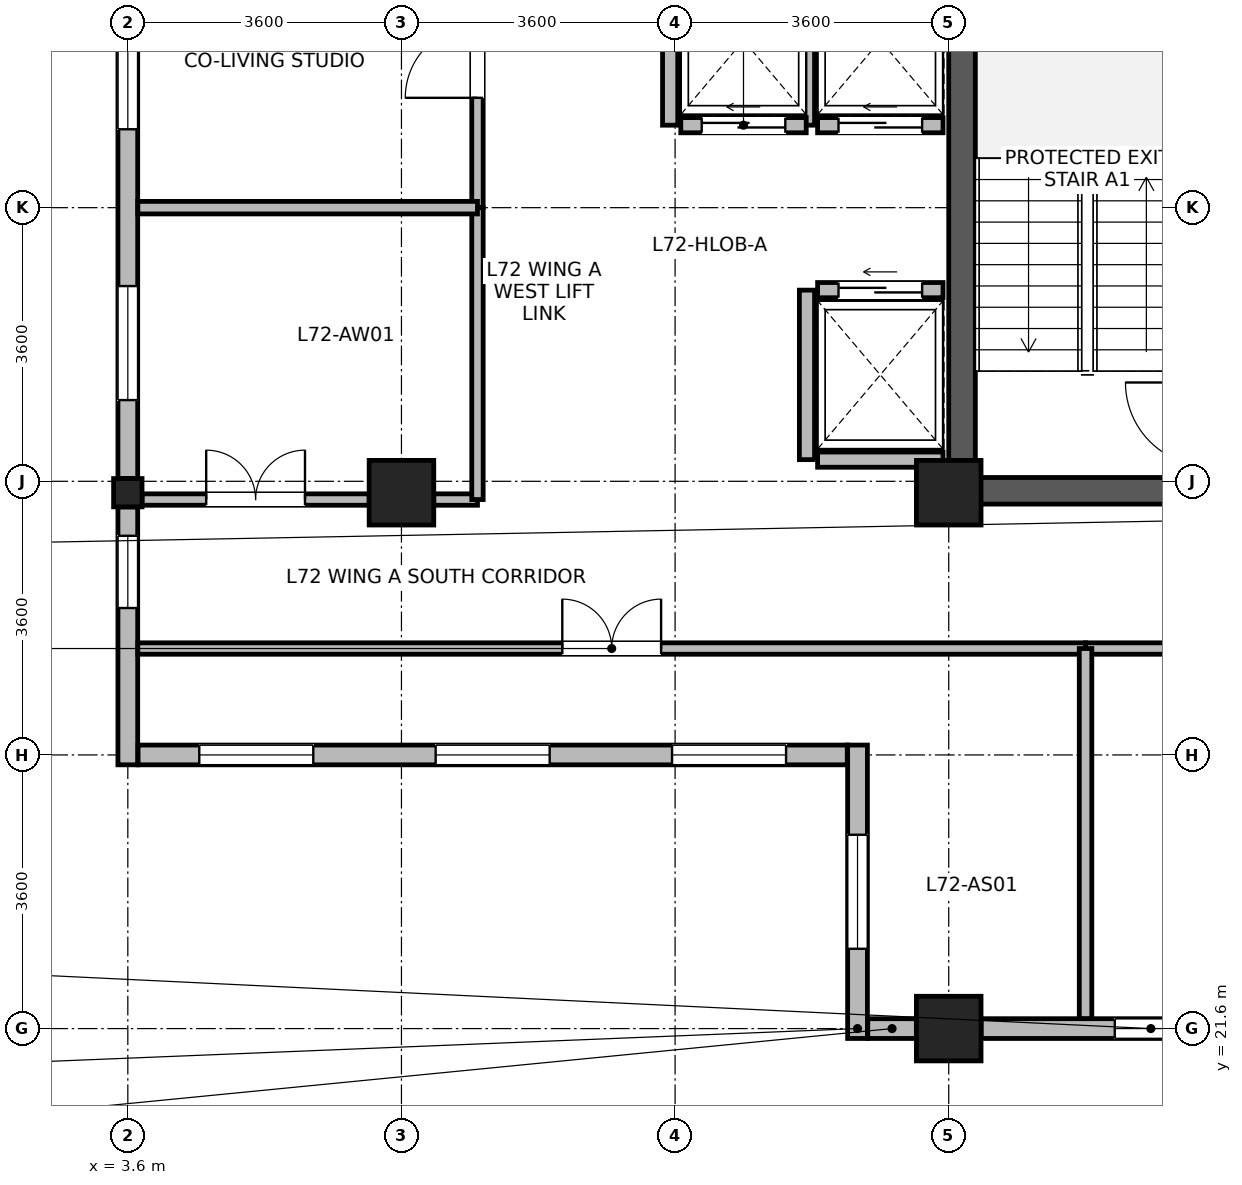
"""IFC4 building model, lengths in metres.
Left out: names, types, materials, properties, quantities, classifications, styles, units other than length and angle.
Written with IfcOpenShell. Run it as: python <this file> out.ifc"""

import sys

from ifc_helpers import new_model, si_unit, direction, frame, frame_2d, origin, origin_2d, place, context, subcontext, project, spatial, rectangle, i_section, extrude, source, transform, mapped, element, fill, save


model = new_model("IFC4")
c1 = context("Model", 3, precision=1e-05, world=origin(), true_north=direction((0.0, 1.0)))
c2 = subcontext(c1, "Body", "Model", "MODEL_VIEW")
j1 = project(units=[si_unit("LENGTHUNIT", "METRE"), si_unit("PLANEANGLEUNIT", "RADIAN")], contexts=[c1])
p1 = place(None, origin())
s1 = spatial("IfcSite", under=j1, at=p1, CompositionType="ELEMENT")
p2 = place(p1, origin())
s2 = spatial("IfcBuilding", under=s1, at=p2, CompositionType="ELEMENT")
p3 = place(p2, frame((0.0, 0.0, 279.5)))
s3 = spatial("IfcBuildingStorey", under=s2, at=p3, CompositionType="ELEMENT", Elevation=279.5)
p4 = place(p3, frame((14.575, 28.5, 0.0), z_axis=(0.0, 0.0, 1.0), x_axis=(0.0, 1.0, 0.0)))
e1 = element("IfcWall", 1, at=p4, inside=s3, PredefinedType="SHEAR", context=c2, shape_type="SweptSolid", body=[
    extrude(rectangle(XDim=7.7, YDim=0.35, at=frame_2d((3.85, 0.0))), origin(), (0.0, 0.0, 1.0), 3.475),
])
p5 = place(p3, frame((14.75, 28.675, 0.0), z_axis=(0.0, 0.0, 1.0), x_axis=(1.0, 0.0, 0.0)))
e2 = element("IfcWall", 2, at=p5, inside=s3, PredefinedType="SHEAR", context=c2, shape_type="SweptSolid", body=[
    extrude(rectangle(XDim=3.2, YDim=0.35, at=frame_2d((1.6, 0.0))), origin(), (0.0, 0.0, 1.0), 3.475),
])
m1 = source(origin(), c2, "Body", "SweptSolid", [
    extrude(rectangle(XDim=0.85, YDim=0.85, at=origin_2d()), origin(), (0.0, 0.0, 1.0), 3.7),
])
for number, where, z_axis, x_axis in (
    (3, (7.2, 28.65, 0.0), (0.0, 0.0, 1.0), (1.0, 0.0, 0.0)),
    (4, (14.4, 21.6, 0.0), (0.0, 0.0, 1.0), (1.0, 0.0, 0.0)),
    (5, (14.4, 28.65, 0.0), (0.0, 0.0, 1.0), (1.0, 0.0, 0.0)),
):
    element("IfcColumn", number, at=place(p3, frame(where, z_axis=z_axis, x_axis=x_axis)), inside=s3, PredefinedType="COLUMN", context=c2, shape_type="MappedRepresentation", body=[
        mapped(m1, transform((0.0, 0.0, 0.0), x_axis=(1.0, 0.0, 0.0), y_axis=(0.0, 1.0, 0.0), z_axis=(0.0, 0.0, 1.0), scale=1.0)),
    ])
m2 = source(origin(), c2, "Body", "SweptSolid", [
    extrude(i_section(OverallWidth=0.374, OverallDepth=0.372, WebThickness=0.015, FlangeThickness=0.026, FilletRadius=0.015, at=origin_2d()), origin(), (0.0, 0.0, 1.0), 3.7),
])
p6 = place(p3, frame((3.6, 28.65, 0.0), z_axis=(0.0, 0.0, 1.0), x_axis=(1.0, 0.0, 0.0)))
e6 = element("IfcColumn", 6, at=p6, inside=s3, PredefinedType="COLUMN", context=c2, shape_type="MappedRepresentation", body=[
    mapped(m2, transform((0.0, 0.0, 0.0), x_axis=(1.0, 0.0, 0.0), y_axis=(0.0, 1.0, 0.0), z_axis=(0.0, 0.0, 1.0), scale=1.0)),
])
p7 = place(p3, frame((13.974, 21.6, 0.0), z_axis=(0.0, 0.0, 1.0), x_axis=(-1.0, 0.0, 0.0)))
e7 = element("IfcWall", 7, at=p7, inside=s3, PredefinedType="STANDARD", context=c2, shape_type="SweptSolid", body=[
    extrude(rectangle(XDim=0.639, YDim=0.26, at=frame_2d((0.32, 0.0))), origin(), (0.0, 0.0, 1.0), 3.455),
])
p8 = place(p3, frame((17.812, 21.6, 0.0), z_axis=(0.0, 0.0, 1.0), x_axis=(-1.0, 0.0, 0.0)))
e8 = element("IfcWall", 8, at=p8, inside=s3, PredefinedType="STANDARD", context=c2, shape_type="SweptSolid", body=[
    extrude(rectangle(XDim=2.986, YDim=0.26, at=frame_2d((1.493, 0.0))), origin(), (0.0, 0.0, 1.0), 3.055),
])
p9 = place(p8, frame((0.278, 0.0, 0.85)))
e9 = element("IfcOpeningElement", 9, at=p9, cuts=e8, PredefinedType="OPENING", context=c2, shape_type="SweptSolid", body=[
    extrude(rectangle(XDim=0.95, YDim=1.75, at=frame_2d((0.475, 0.875))), frame((0.0, 0.14, 0.0), z_axis=(0.0, -1.0, 0.0), x_axis=(1.0, 0.0, 0.0)), (0.0, 0.0, 1.0), 0.28),
])
p10 = place(p3, frame((3.6, 28.837, 0.0), z_axis=(0.0, 0.0, 1.0), x_axis=(0.0, 1.0, 0.0)))
e10 = element("IfcWall", 10, at=p10, inside=s3, PredefinedType="STANDARD", context=c2, shape_type="SweptSolid", body=[
    extrude(rectangle(XDim=7.126, YDim=0.26, at=frame_2d((3.563, 0.0))), origin(), (0.0, 0.0, 1.0), 3.055),
])
p11 = place(p10, frame((1.031, 0.0, 0.85)))
e11 = element("IfcOpeningElement", 11, at=p11, cuts=e10, PredefinedType="OPENING", context=c2, shape_type="SweptSolid", body=[
    extrude(rectangle(XDim=1.5, YDim=1.85, at=frame_2d((0.75, 0.925))), frame((0.0, 0.14, 0.0), z_axis=(0.0, -1.0, 0.0), x_axis=(1.0, 0.0, 0.0)), (0.0, 0.0, 1.0), 0.28),
])
p12 = place(p10, frame((4.594, 0.0, 0.85)))
e12 = element("IfcOpeningElement", 12, at=p12, cuts=e10, PredefinedType="OPENING", context=c2, shape_type="SweptSolid", body=[
    extrude(rectangle(XDim=1.5, YDim=1.85, at=frame_2d((0.75, 0.925))), frame((0.0, 0.14, 0.0), z_axis=(0.0, -1.0, 0.0), x_axis=(1.0, 0.0, 0.0)), (0.0, 0.0, 1.0), 0.28),
])
p13 = place(p3, frame((3.6, 25.07, 0.0), z_axis=(0.0, 0.0, 1.0), x_axis=(0.0, 1.0, 0.0)))
e13 = element("IfcWall", 13, at=p13, inside=s3, PredefinedType="STANDARD", context=c2, shape_type="SweptSolid", body=[
    extrude(rectangle(XDim=3.393, YDim=0.26, at=frame_2d((1.696, 0.0))), origin(), (0.0, 0.0, 1.0), 3.455),
])
p14 = place(p13, frame((2.063, 0.0, 0.85)))
e14 = element("IfcOpeningElement", 14, at=p14, cuts=e13, PredefinedType="OPENING", context=c2, shape_type="SweptSolid", body=[
    extrude(rectangle(XDim=0.95, YDim=1.75, at=frame_2d((0.475, 0.875))), frame((0.0, 0.14, 0.0), z_axis=(0.0, -1.0, 0.0), x_axis=(1.0, 0.0, 0.0)), (0.0, 0.0, 1.0), 0.28),
])
p15 = place(p3, frame((13.065, 25.2, 0.0), z_axis=(0.0, 0.0, 1.0), x_axis=(-1.0, 0.0, 0.0)))
e15 = element("IfcWall", 15, at=p15, inside=s3, PredefinedType="STANDARD", context=c2, shape_type="SweptSolid", body=[
    extrude(rectangle(XDim=9.33, YDim=0.26, at=frame_2d((4.665, 0.0))), origin(), (0.0, 0.0, 1.0), 3.455),
])
p16 = place(p15, frame((0.805, 0.0, 0.85)))
e16 = element("IfcOpeningElement", 16, at=p16, cuts=e15, PredefinedType="OPENING", context=c2, shape_type="SweptSolid", body=[
    extrude(rectangle(XDim=1.5, YDim=1.85, at=frame_2d((0.75, 0.925))), frame((0.0, 0.14, 0.0), z_axis=(0.0, -1.0, 0.0), x_axis=(1.0, 0.0, 0.0)), (0.0, 0.0, 1.0), 0.28),
])
p17 = place(p15, frame((3.915, 0.0, 0.85)))
e17 = element("IfcOpeningElement", 17, at=p17, cuts=e15, PredefinedType="OPENING", context=c2, shape_type="SweptSolid", body=[
    extrude(rectangle(XDim=1.5, YDim=1.85, at=frame_2d((0.75, 0.925))), frame((0.0, 0.14, 0.0), z_axis=(0.0, -1.0, 0.0), x_axis=(1.0, 0.0, 0.0)), (0.0, 0.0, 1.0), 0.28),
])
p18 = place(p15, frame((7.025, 0.0, 0.85)))
e18 = element("IfcOpeningElement", 18, at=p18, cuts=e15, PredefinedType="OPENING", context=c2, shape_type="SweptSolid", body=[
    extrude(rectangle(XDim=1.5, YDim=1.85, at=frame_2d((0.75, 0.925))), frame((0.0, 0.14, 0.0), z_axis=(0.0, -1.0, 0.0), x_axis=(1.0, 0.0, 0.0)), (0.0, 0.0, 1.0), 0.28),
])
p19 = place(p3, frame((13.2, 21.47, 0.0), z_axis=(0.0, 0.0, 1.0), x_axis=(0.0, 1.0, 0.0)))
e19 = element("IfcWall", 19, at=p19, inside=s3, PredefinedType="STANDARD", context=c2, shape_type="SweptSolid", body=[
    extrude(rectangle(XDim=3.86, YDim=0.26, at=frame_2d((1.93, 0.0))), origin(), (0.0, 0.0, 1.0), 3.455),
])
p20 = place(p19, frame((1.18, 0.0, 0.85)))
e20 = element("IfcOpeningElement", 20, at=p20, cuts=e19, PredefinedType="OPENING", context=c2, shape_type="SweptSolid", body=[
    extrude(rectangle(XDim=1.5, YDim=1.85, at=frame_2d((0.75, 0.925))), frame((0.0, 0.14, 0.0), z_axis=(0.0, -1.0, 0.0), x_axis=(1.0, 0.0, 0.0)), (0.0, 0.0, 1.0), 0.28),
])
p21 = place(p3, frame((12.675, 33.485, 0.0), z_axis=(0.0, 0.0, 1.0), x_axis=(1.0, 0.0, 0.0)))
e21 = element("IfcWall", 21, at=p21, inside=s3, PredefinedType="PARTITIONING", context=c2, shape_type="SweptSolid", body=[
    extrude(rectangle(XDim=1.65, YDim=0.2, at=frame_2d((0.825, 0.0))), origin(), (0.0, 0.0, 1.0), 3.455),
])
p22 = place(p21, frame((0.275, 0.0, 0.0)))
e22 = element("IfcOpeningElement", 22, at=p22, cuts=e21, PredefinedType="OPENING", context=c2, shape_type="SweptSolid", body=[
    extrude(rectangle(XDim=1.1, YDim=2.12, at=frame_2d((0.55, 1.06))), frame((0.0, 0.11, 0.0), z_axis=(0.0, -1.0, 0.0), x_axis=(1.0, 0.0, 0.0)), (0.0, 0.0, 1.0), 0.22),
])
p23 = place(p3, frame((12.535, 33.485, 0.0), z_axis=(0.0, 0.0, 1.0), x_axis=(0.0, 1.0, 0.0)))
e23 = element("IfcWall", 23, at=p23, inside=s3, PredefinedType="PARTITIONING", context=c2, shape_type="SweptSolid", body=[
    extrude(rectangle(XDim=2.23, YDim=0.2, at=frame_2d((1.115, 0.0))), origin(), (0.0, 0.0, 1.0), 3.455),
])
p24 = place(p3, frame((12.675, 29.085, 0.0), z_axis=(0.0, 0.0, 1.0), x_axis=(1.0, 0.0, 0.0)))
e24 = element("IfcWall", 24, at=p24, inside=s3, PredefinedType="PARTITIONING", context=c2, shape_type="SweptSolid", body=[
    extrude(rectangle(XDim=1.65, YDim=0.2, at=frame_2d((0.825, 0.0))), origin(), (0.0, 0.0, 1.0), 3.455),
])
p25 = place(p3, frame((12.675, 31.315, 0.0), z_axis=(0.0, 0.0, 1.0), x_axis=(1.0, 0.0, 0.0)))
e25 = element("IfcWall", 25, at=p25, inside=s3, PredefinedType="PARTITIONING", context=c2, shape_type="SweptSolid", body=[
    extrude(rectangle(XDim=1.65, YDim=0.2, at=frame_2d((0.825, 0.0))), origin(), (0.0, 0.0, 1.0), 3.455),
])
p26 = place(p25, frame((0.275, 0.0, 0.0)))
e26 = element("IfcOpeningElement", 26, at=p26, cuts=e25, PredefinedType="OPENING", context=c2, shape_type="SweptSolid", body=[
    extrude(rectangle(XDim=1.1, YDim=2.12, at=frame_2d((0.55, 1.06))), frame((0.0, 0.11, 0.0), z_axis=(0.0, -1.0, 0.0), x_axis=(1.0, 0.0, 0.0)), (0.0, 0.0, 1.0), 0.22),
])
p27 = place(p3, frame((12.535, 29.085, 0.0), z_axis=(0.0, 0.0, 1.0), x_axis=(0.0, 1.0, 0.0)))
e27 = element("IfcWall", 27, at=p27, inside=s3, PredefinedType="PARTITIONING", context=c2, shape_type="SweptSolid", body=[
    extrude(rectangle(XDim=2.23, YDim=0.2, at=frame_2d((1.115, 0.0))), origin(), (0.0, 0.0, 1.0), 3.455),
])
p28 = place(p3, frame((10.875, 33.485, 0.0), z_axis=(0.0, 0.0, 1.0), x_axis=(1.0, 0.0, 0.0)))
e28 = element("IfcWall", 28, at=p28, inside=s3, PredefinedType="PARTITIONING", context=c2, shape_type="SweptSolid", body=[
    extrude(rectangle(XDim=1.65, YDim=0.2, at=frame_2d((0.825, 0.0))), origin(), (0.0, 0.0, 1.0), 3.455),
])
p29 = place(p28, frame((0.275, 0.0, 0.0)))
e29 = element("IfcOpeningElement", 29, at=p29, cuts=e28, PredefinedType="OPENING", context=c2, shape_type="SweptSolid", body=[
    extrude(rectangle(XDim=1.1, YDim=2.12, at=frame_2d((0.55, 1.06))), frame((0.0, 0.11, 0.0), z_axis=(0.0, -1.0, 0.0), x_axis=(1.0, 0.0, 0.0)), (0.0, 0.0, 1.0), 0.22),
])
p30 = place(p3, frame((10.735, 33.485, 0.0), z_axis=(0.0, 0.0, 1.0), x_axis=(0.0, 1.0, 0.0)))
e30 = element("IfcWall", 30, at=p30, inside=s3, PredefinedType="PARTITIONING", context=c2, shape_type="SweptSolid", body=[
    extrude(rectangle(XDim=2.23, YDim=0.2, at=frame_2d((1.115, 0.0))), origin(), (0.0, 0.0, 1.0), 3.455),
])
p31 = place(p3, frame((16.2, 26.6, 0.0), z_axis=(0.0, 0.0, 1.0), x_axis=(1.0, 0.0, 0.0)))
e31 = element("IfcWall", 31, at=p31, inside=s3, PredefinedType="PARTITIONING", context=c2, shape_type="SweptSolid", body=[
    extrude(rectangle(XDim=18.9, YDim=0.15, at=frame_2d((9.45, 0.0))), origin(), (0.0, 0.0, 1.0), 3.455),
])
p32 = place(p31, frame((8.8, 0.0, 0.0)))
e32 = element("IfcOpeningElement", 32, at=p32, cuts=e31, PredefinedType="OPENING", context=c2, shape_type="SweptSolid", body=[
    extrude(rectangle(XDim=1.3, YDim=2.12, at=frame_2d((0.65, 1.06))), frame((0.0, 0.085, 0.0), z_axis=(0.0, -1.0, 0.0), x_axis=(1.0, 0.0, 0.0)), (0.0, 0.0, 1.0), 0.17),
])
p33 = place(p3, frame((3.732, 26.6, 0.0), z_axis=(0.0, 0.0, 1.0), x_axis=(1.0, 0.0, 0.0)))
e33 = element("IfcWall", 33, at=p33, inside=s3, PredefinedType="PARTITIONING", context=c2, shape_type="SweptSolid", body=[
    extrude(rectangle(XDim=12.468, YDim=0.15, at=frame_2d((6.234, 0.0))), origin(), (0.0, 0.0, 1.0), 3.455),
])
p34 = place(p33, frame((5.584, 0.0, 0.0)))
e34 = element("IfcOpeningElement", 34, at=p34, cuts=e33, PredefinedType="OPENING", context=c2, shape_type="SweptSolid", body=[
    extrude(rectangle(XDim=1.3, YDim=2.12, at=frame_2d((0.65, 1.06))), frame((0.0, 0.085, 0.0), z_axis=(0.0, -1.0, 0.0), x_axis=(1.0, 0.0, 0.0)), (0.0, 0.0, 1.0), 0.17),
])
p35 = place(p3, frame((3.787, 28.56, 0.0), z_axis=(0.0, 0.0, 1.0), x_axis=(1.0, 0.0, 0.0)))
e35 = element("IfcWall", 35, at=p35, inside=s3, PredefinedType="PARTITIONING", context=c2, shape_type="SweptSolid", body=[
    extrude(rectangle(XDim=2.988, YDim=0.15, at=frame_2d((1.494, 0.0))), origin(), (0.0, 0.0, 1.0), 2.905),
])
p36 = place(p35, frame((0.844, 0.0, 0.0)))
e36 = element("IfcOpeningElement", 36, at=p36, cuts=e35, PredefinedType="OPENING", context=c2, shape_type="SweptSolid", body=[
    extrude(rectangle(XDim=1.3, YDim=2.12, at=frame_2d((0.65, 1.06))), frame((0.0, 0.085, 0.0), z_axis=(0.0, -1.0, 0.0), x_axis=(1.0, 0.0, 0.0)), (0.0, 0.0, 1.0), 0.17),
])
p37 = place(p3, frame((7.625, 28.56, 0.0), z_axis=(0.0, 0.0, 1.0), x_axis=(1.0, 0.0, 0.0)))
e37 = element("IfcWall", 37, at=p37, inside=s3, PredefinedType="PARTITIONING", context=c2, shape_type="SweptSolid", body=[
    extrude(rectangle(XDim=0.575, YDim=0.15, at=frame_2d((0.288, 0.0))), origin(), (0.0, 0.0, 1.0), 2.905),
])
p38 = place(p3, frame((8.2, 32.4, 0.0), z_axis=(0.0, 0.0, 1.0), x_axis=(0.0, 1.0, 0.0)))
e38 = element("IfcWall", 38, at=p38, inside=s3, PredefinedType="PARTITIONING", context=c2, shape_type="SweptSolid", body=[
    extrude(rectangle(XDim=3.84, YDim=0.15, at=frame_2d((1.92, 0.0))), origin(), (0.0, 0.0, 1.0), 3.455),
])
p39 = place(p38, frame((1.445, 0.0, 0.0)))
e39 = element("IfcOpeningElement", 39, at=p39, cuts=e38, PredefinedType="OPENING", context=c2, shape_type="SweptSolid", body=[
    extrude(rectangle(XDim=0.95, YDim=2.1, at=frame_2d((0.475, 1.05))), frame((0.0, 0.085, 0.0), z_axis=(0.0, -1.0, 0.0), x_axis=(1.0, 0.0, 0.0)), (0.0, 0.0, 1.0), 0.17),
])
p40 = place(p3, frame((8.2, 28.56, 0.0), z_axis=(0.0, 0.0, 1.0), x_axis=(0.0, 1.0, 0.0)))
e40 = element("IfcWall", 40, at=p40, inside=s3, PredefinedType="PARTITIONING", context=c2, shape_type="SweptSolid", body=[
    extrude(rectangle(XDim=3.84, YDim=0.15, at=frame_2d((1.92, 0.0))), origin(), (0.0, 0.0, 1.0), 3.455),
])
p41 = place(p3, frame((16.2, 21.732, 0.0), z_axis=(0.0, 0.0, 1.0), x_axis=(0.0, 1.0, 0.0)))
e41 = element("IfcWall", 41, at=p41, inside=s3, PredefinedType="PARTITIONING", context=c2, shape_type="SweptSolid", body=[
    extrude(rectangle(XDim=4.868, YDim=0.165, at=frame_2d((2.434, 0.0))), origin(), (0.0, 0.0, 1.0), 3.455),
])
p42 = place(p3, frame((3.732, 32.4, 0.0), z_axis=(0.0, 0.0, 1.0), x_axis=(1.0, 0.0, 0.0)))
e42 = element("IfcWall", 42, at=p42, inside=s3, PredefinedType="PARTITIONING", context=c2, shape_type="SweptSolid", body=[
    extrude(rectangle(XDim=4.468, YDim=0.165, at=frame_2d((2.234, 0.0))), origin(), (0.0, 0.0, 1.0), 3.455),
])
p43 = place(p9, origin())
e43 = element("IfcWindow", 43, at=p43, inside=s3, PartitioningType="SINGLE_PANEL", PredefinedType="WINDOW", context=c2, shape_type="SweptSolid", body=[
    extrude(rectangle(XDim=0.95, YDim=1.75, at=frame_2d((0.475, 0.875))), frame((0.0, 0.03, 0.0), z_axis=(0.0, -1.0, 0.0), x_axis=(1.0, 0.0, 0.0)), (0.0, 0.0, 1.0), 0.06),
])
fill(e9, e43)
p44 = place(p11, origin())
e44 = element("IfcWindow", 44, at=p44, inside=s3, PartitioningType="SINGLE_PANEL", PredefinedType="WINDOW", context=c2, shape_type="SweptSolid", body=[
    extrude(rectangle(XDim=1.5, YDim=1.85, at=frame_2d((0.75, 0.925))), frame((0.0, 0.03, 0.0), z_axis=(0.0, -1.0, 0.0), x_axis=(1.0, 0.0, 0.0)), (0.0, 0.0, 1.0), 0.06),
])
fill(e11, e44)
p45 = place(p12, origin())
e45 = element("IfcWindow", 45, at=p45, inside=s3, PartitioningType="SINGLE_PANEL", PredefinedType="WINDOW", context=c2, shape_type="SweptSolid", body=[
    extrude(rectangle(XDim=1.5, YDim=1.85, at=frame_2d((0.75, 0.925))), frame((0.0, 0.03, 0.0), z_axis=(0.0, -1.0, 0.0), x_axis=(1.0, 0.0, 0.0)), (0.0, 0.0, 1.0), 0.06),
])
fill(e12, e45)
p46 = place(p14, origin())
e46 = element("IfcWindow", 46, at=p46, inside=s3, PartitioningType="SINGLE_PANEL", PredefinedType="WINDOW", context=c2, shape_type="SweptSolid", body=[
    extrude(rectangle(XDim=0.95, YDim=1.75, at=frame_2d((0.475, 0.875))), frame((0.0, 0.03, 0.0), z_axis=(0.0, -1.0, 0.0), x_axis=(1.0, 0.0, 0.0)), (0.0, 0.0, 1.0), 0.06),
])
fill(e14, e46)
p47 = place(p16, origin())
e47 = element("IfcWindow", 47, at=p47, inside=s3, PartitioningType="SINGLE_PANEL", PredefinedType="WINDOW", context=c2, shape_type="SweptSolid", body=[
    extrude(rectangle(XDim=1.5, YDim=1.85, at=frame_2d((0.75, 0.925))), frame((0.0, 0.03, 0.0), z_axis=(0.0, -1.0, 0.0), x_axis=(1.0, 0.0, 0.0)), (0.0, 0.0, 1.0), 0.06),
])
fill(e16, e47)
p48 = place(p17, origin())
e48 = element("IfcWindow", 48, at=p48, inside=s3, PartitioningType="SINGLE_PANEL", PredefinedType="WINDOW", context=c2, shape_type="SweptSolid", body=[
    extrude(rectangle(XDim=1.5, YDim=1.85, at=frame_2d((0.75, 0.925))), frame((0.0, 0.03, 0.0), z_axis=(0.0, -1.0, 0.0), x_axis=(1.0, 0.0, 0.0)), (0.0, 0.0, 1.0), 0.06),
])
fill(e17, e48)
p49 = place(p18, origin())
e49 = element("IfcWindow", 49, at=p49, inside=s3, PartitioningType="SINGLE_PANEL", PredefinedType="WINDOW", context=c2, shape_type="SweptSolid", body=[
    extrude(rectangle(XDim=1.5, YDim=1.85, at=frame_2d((0.75, 0.925))), frame((0.0, 0.03, 0.0), z_axis=(0.0, -1.0, 0.0), x_axis=(1.0, 0.0, 0.0)), (0.0, 0.0, 1.0), 0.06),
])
fill(e18, e49)
p50 = place(p20, origin())
e50 = element("IfcWindow", 50, at=p50, inside=s3, PartitioningType="SINGLE_PANEL", PredefinedType="WINDOW", context=c2, shape_type="SweptSolid", body=[
    extrude(rectangle(XDim=1.5, YDim=1.85, at=frame_2d((0.75, 0.925))), frame((0.0, 0.03, 0.0), z_axis=(0.0, -1.0, 0.0), x_axis=(1.0, 0.0, 0.0)), (0.0, 0.0, 1.0), 0.06),
])
fill(e20, e50)
p51 = place(p22, origin())
e51 = element("IfcDoor", 51, at=p51, inside=s3, OperationType="SLIDING_TO_LEFT", PredefinedType="DOOR", context=c2, shape_type="SweptSolid", body=[
    extrude(rectangle(XDim=1.1, YDim=2.12, at=frame_2d((0.55, 1.06))), frame((0.0, 0.025, 0.0), z_axis=(0.0, -1.0, 0.0), x_axis=(1.0, 0.0, 0.0)), (0.0, 0.0, 1.0), 0.05),
])
fill(e22, e51)
p52 = place(p26, origin())
e52 = element("IfcDoor", 52, at=p52, inside=s3, OperationType="SLIDING_TO_LEFT", PredefinedType="DOOR", context=c2, shape_type="SweptSolid", body=[
    extrude(rectangle(XDim=1.1, YDim=2.12, at=frame_2d((0.55, 1.06))), frame((0.0, 0.025, 0.0), z_axis=(0.0, -1.0, 0.0), x_axis=(1.0, 0.0, 0.0)), (0.0, 0.0, 1.0), 0.05),
])
fill(e26, e52)
p53 = place(p29, origin())
e53 = element("IfcDoor", 53, at=p53, inside=s3, OperationType="SLIDING_TO_LEFT", PredefinedType="DOOR", context=c2, shape_type="SweptSolid", body=[
    extrude(rectangle(XDim=1.1, YDim=2.12, at=frame_2d((0.55, 1.06))), frame((0.0, 0.025, 0.0), z_axis=(0.0, -1.0, 0.0), x_axis=(1.0, 0.0, 0.0)), (0.0, 0.0, 1.0), 0.05),
])
fill(e29, e53)
p54 = place(p34, origin())
e54 = element("IfcDoor", 54, at=p54, inside=s3, OperationType="DOUBLE_DOOR_SINGLE_SWING", PredefinedType="DOOR", context=c2, shape_type="SweptSolid", body=[
    extrude(rectangle(XDim=1.3, YDim=2.12, at=frame_2d((0.65, 1.06))), frame((0.0, 0.025, 0.0), z_axis=(0.0, -1.0, 0.0), x_axis=(1.0, 0.0, 0.0)), (0.0, 0.0, 1.0), 0.05),
])
fill(e34, e54)
p55 = place(p36, origin())
e55 = element("IfcDoor", 55, at=p55, inside=s3, OperationType="DOUBLE_DOOR_SINGLE_SWING", PredefinedType="DOOR", context=c2, shape_type="SweptSolid", body=[
    extrude(rectangle(XDim=1.3, YDim=2.12, at=frame_2d((0.65, 1.06))), frame((0.0, 0.025, 0.0), z_axis=(0.0, -1.0, 0.0), x_axis=(1.0, 0.0, 0.0)), (0.0, 0.0, 1.0), 0.05),
])
fill(e36, e55)
p56 = place(p39, origin())
e56 = element("IfcDoor", 56, at=p56, inside=s3, OperationType="SINGLE_SWING_LEFT", PredefinedType="DOOR", context=c2, shape_type="SweptSolid", body=[
    extrude(rectangle(XDim=0.95, YDim=2.1, at=frame_2d((0.475, 1.05))), frame((0.0, 0.025, 0.0), z_axis=(0.0, -1.0, 0.0), x_axis=(1.0, 0.0, 0.0)), (0.0, 0.0, 1.0), 0.05),
])
fill(e39, e56)
save(model, sys.argv[1])
